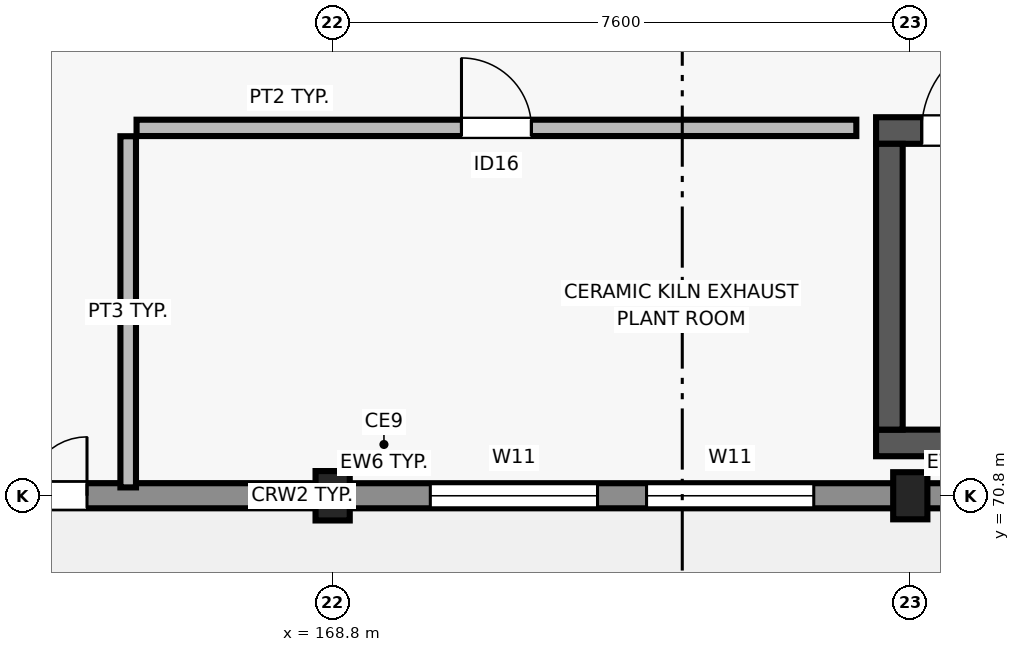
"""IFC4 building model, lengths in metres.
Left out: names, types, materials, properties, quantities, classifications, styles, units other than length and angle.
Written with IfcOpenShell. Run it as: python <this file> out.ifc"""

import sys

from ifc_helpers import new_model, si_unit, direction, frame, frame_2d, origin, origin_2d, place, context, subcontext, project, spatial, polyline, rectangle, outline, extrude, element, fill, save


model = new_model("IFC4")
c1 = context("Model", 3, precision=1e-05, world=origin(), true_north=direction((0.0, 1.0)))
c2 = subcontext(c1, "Body", "Model", "MODEL_VIEW")
j1 = project(units=[si_unit("LENGTHUNIT", "METRE"), si_unit("PLANEANGLEUNIT", "RADIAN")], contexts=[c1])
p1 = place(None, origin())
s1 = spatial("IfcSite", under=j1, at=p1, CompositionType="ELEMENT")
p2 = place(p1, origin())
s2 = spatial("IfcBuilding", under=s1, at=p2, CompositionType="ELEMENT")
p3 = place(p2, frame((0.0, 0.0, 25.8)))
s3 = spatial("IfcBuildingStorey", under=s2, at=p3, CompositionType="ELEMENT", Elevation=25.8)
p4 = place(p3, frame((168.8, 70.8, 0.0), z_axis=(0.0, 0.0, 1.0), x_axis=(1.0, 0.0, 0.0)))
e1 = element("IfcColumn", 1, at=p4, inside=s3, PredefinedType="COLUMN", context=c2, shape_type="SweptSolid", body=[
    extrude(rectangle(XDim=0.65, YDim=0.45, at=origin_2d()), origin(), (0.0, 0.0, 1.0), 4.2),
])
p5 = place(p3, frame((176.4, 70.8, 0.0), z_axis=(0.0, 0.0, 1.0), x_axis=(1.0, 0.0, 0.0)))
e2 = element("IfcColumn", 2, at=p5, inside=s3, PredefinedType="COLUMN", context=c2, shape_type="SweptSolid", body=[
    extrude(rectangle(XDim=0.62, YDim=0.45, at=origin_2d()), origin(), (0.0, 0.0, 1.0), 4.2),
])
p6 = place(p3, frame((161.105, 70.8, 0.0), z_axis=(0.0, 0.0, 1.0), x_axis=(1.0, 0.0, 0.0)))
e3 = element("IfcWall", 3, at=p6, inside=s3, PredefinedType="SOLIDWALL", context=c2, shape_type="SweptSolid", body=[
    extrude(rectangle(XDim=7.375, YDim=0.32, at=frame_2d((3.688, 0.0))), origin(), (0.0, 0.0, 1.0), 3.425),
])
p7 = place(p6, frame((2.913, 0.0, 0.0)))
e4 = element("IfcOpeningElement", 4, at=p7, cuts=e3, PredefinedType="OPENING", context=c2, shape_type="SweptSolid", body=[
    extrude(rectangle(XDim=1.55, YDim=2.2, at=frame_2d((0.775, 1.1))), frame((0.0, 0.17, 0.0), z_axis=(0.0, -1.0, 0.0), x_axis=(1.0, 0.0, 0.0)), (0.0, 0.0, 1.0), 0.34),
])
p8 = place(p3, frame((169.12, 70.8, 0.0), z_axis=(0.0, 0.0, 1.0), x_axis=(1.0, 0.0, 0.0)))
e5 = element("IfcWall", 5, at=p8, inside=s3, PredefinedType="SOLIDWALL", context=c2, shape_type="SweptSolid", body=[
    extrude(rectangle(XDim=6.975, YDim=0.305, at=frame_2d((3.487, 0.0))), origin(), (0.0, 0.0, 1.0), 3.425),
])
p9 = place(p8, frame((0.965, 0.0, 0.9)))
e6 = element("IfcOpeningElement", 6, at=p9, cuts=e5, PredefinedType="OPENING", context=c2, shape_type="SweptSolid", body=[
    extrude(rectangle(XDim=2.2, YDim=1.5, at=frame_2d((1.1, 0.75))), frame((0.0, 0.162, 0.0), z_axis=(0.0, -1.0, 0.0), x_axis=(1.0, 0.0, 0.0)), (0.0, 0.0, 1.0), 0.325),
])
p10 = place(p8, frame((3.81, 0.0, 0.9)))
e7 = element("IfcOpeningElement", 7, at=p10, cuts=e5, PredefinedType="OPENING", context=c2, shape_type="SweptSolid", body=[
    extrude(rectangle(XDim=2.2, YDim=1.5, at=frame_2d((1.1, 0.75))), frame((0.0, 0.162, 0.0), z_axis=(0.0, -1.0, 0.0), x_axis=(1.0, 0.0, 0.0)), (0.0, 0.0, 1.0), 0.325),
])
p11 = place(p3, frame((176.705, 70.8, 0.0), z_axis=(0.0, 0.0, 1.0), x_axis=(1.0, 0.0, 0.0)))
e8 = element("IfcWall", 8, at=p11, inside=s3, PredefinedType="SOLIDWALL", context=c2, shape_type="SweptSolid", body=[
    extrude(rectangle(XDim=6.975, YDim=0.29, at=frame_2d((3.487, 0.0))), origin(), (0.0, 0.0, 1.0), 3.425),
])
p12 = place(p11, frame((1.232, 0.0, 0.9)))
e9 = element("IfcOpeningElement", 9, at=p12, cuts=e8, PredefinedType="OPENING", context=c2, shape_type="SweptSolid", body=[
    extrude(rectangle(XDim=1.8, YDim=1.5, at=frame_2d((0.9, 0.75))), frame((0.0, 0.155, 0.0), z_axis=(0.0, -1.0, 0.0), x_axis=(1.0, 0.0, 0.0)), (0.0, 0.0, 1.0), 0.31),
])
p13 = place(p11, frame((3.943, 0.0, 0.9)))
e10 = element("IfcOpeningElement", 10, at=p13, cuts=e8, PredefinedType="OPENING", context=c2, shape_type="SweptSolid", body=[
    extrude(rectangle(XDim=1.8, YDim=1.5, at=frame_2d((0.9, 0.75))), frame((0.0, 0.155, 0.0), z_axis=(0.0, -1.0, 0.0), x_axis=(1.0, 0.0, 0.0)), (0.0, 0.0, 1.0), 0.31),
])
p14 = place(p3, frame((152.8, 70.8, 4.2), z_axis=(0.0, 0.0, 1.0), x_axis=(1.0, 0.0, 0.0)))
e11 = element("IfcWall", 11, at=p14, inside=s3, PredefinedType="PARAPET", context=c2, shape_type="SweptSolid", body=[
    extrude(outline(polyline([(0.0, 0.0), (31.2, 0.0), (31.2, 4.4), (29.25, 3.788), (27.3, 3.258), (25.35, 2.808), (23.4, 2.437), (21.45, 2.142), (19.5, 1.922), (17.55, 1.776), (15.6, 1.704), (13.65, 1.704), (11.7, 1.778), (9.75, 1.926), (7.8, 2.147), (5.85, 2.444), (3.9, 2.817), (1.95, 3.269), (0.0, 3.8), (0.0, 0.0)])), frame((0.0, 0.165, 0.0), z_axis=(0.0, -1.0, 0.0), x_axis=(1.0, 0.0, 0.0)), (0.0, 0.0, 1.0), 0.33),
])
p15 = place(p3, frame((175.95, 71.495, 0.0), z_axis=(0.0, 0.0, 1.0), x_axis=(1.0, 0.0, 0.0)))
e12 = element("IfcWall", 12, at=p15, inside=s3, PredefinedType="SHEAR", context=c2, shape_type="SweptSolid", body=[
    extrude(rectangle(XDim=8.1, YDim=0.35, at=frame_2d((4.05, 0.0))), origin(), (0.0, 0.0, 1.0), 3.92),
])
p16 = place(p3, frame((175.95, 75.605, 0.0), z_axis=(0.0, 0.0, 1.0), x_axis=(1.0, 0.0, 0.0)))
e13 = element("IfcWall", 13, at=p16, inside=s3, PredefinedType="SHEAR", context=c2, shape_type="SweptSolid", body=[
    extrude(rectangle(XDim=8.1, YDim=0.35, at=frame_2d((4.05, 0.0))), origin(), (0.0, 0.0, 1.0), 3.92),
])
p17 = place(p16, frame((0.6, 0.0, 0.0)))
e14 = element("IfcOpeningElement", 14, at=p17, cuts=e13, PredefinedType="OPENING", context=c2, shape_type="SweptSolid", body=[
    extrude(rectangle(XDim=1.25, YDim=2.2, at=frame_2d((0.625, 1.1))), frame((0.0, 0.185, 0.0), z_axis=(0.0, -1.0, 0.0), x_axis=(1.0, 0.0, 0.0)), (0.0, 0.0, 1.0), 0.37),
])
p18 = place(p3, frame((176.125, 71.67, 0.0), z_axis=(0.0, 0.0, 1.0), x_axis=(0.0, 1.0, 0.0)))
e15 = element("IfcWall", 15, at=p18, inside=s3, PredefinedType="SHEAR", context=c2, shape_type="SweptSolid", body=[
    extrude(rectangle(XDim=3.76, YDim=0.35, at=frame_2d((1.88, 0.0))), origin(), (0.0, 0.0, 1.0), 3.92),
])
p19 = place(p3, frame((166.22, 75.64, 0.0), z_axis=(0.0, 0.0, 1.0), x_axis=(1.0, 0.0, 0.0)))
e16 = element("IfcWall", 16, at=p19, inside=s3, PredefinedType="PARTITIONING", context=c2, shape_type="SweptSolid", body=[
    extrude(rectangle(XDim=9.47, YDim=0.215, at=frame_2d((4.735, 0.0))), origin(), (0.0, 0.0, 1.0), 3.9),
])
p20 = place(p19, frame((4.275, 0.0, 0.0)))
e17 = element("IfcOpeningElement", 17, at=p20, cuts=e16, PredefinedType="OPENING", context=c2, shape_type="SweptSolid", body=[
    extrude(rectangle(XDim=0.92, YDim=2.1, at=frame_2d((0.46, 1.05))), frame((0.0, 0.117, 0.0), z_axis=(0.0, -1.0, 0.0), x_axis=(1.0, 0.0, 0.0)), (0.0, 0.0, 1.0), 0.235),
])
p21 = place(p3, frame((166.11, 70.91, 0.0), z_axis=(0.0, 0.0, 1.0), x_axis=(0.0, 1.0, 0.0)))
e18 = element("IfcWall", 18, at=p21, inside=s3, PredefinedType="PARTITIONING", context=c2, shape_type="SweptSolid", body=[
    extrude(rectangle(XDim=4.62, YDim=0.205, at=frame_2d((2.31, 0.0))), origin(), (0.0, 0.0, 1.0), 3.9),
])
p22 = place(p7, frame((1.55, 0.0, 0.0), z_axis=(0.0, 0.0, 1.0), x_axis=(-1.0, 0.0, 0.0)))
e19 = element("IfcDoor", 19, at=p22, inside=s3, OperationType="DOUBLE_DOOR_SINGLE_SWING", PredefinedType="DOOR", context=c2, shape_type="SweptSolid", body=[
    extrude(rectangle(XDim=1.55, YDim=2.2, at=frame_2d((0.775, 1.1))), frame((0.0, 0.025, 0.0), z_axis=(0.0, -1.0, 0.0), x_axis=(1.0, 0.0, 0.0)), (0.0, 0.0, 1.0), 0.05),
])
fill(e4, e19)
p23 = place(p9, origin())
e20 = element("IfcWindow", 20, at=p23, inside=s3, PartitioningType="SINGLE_PANEL", PredefinedType="WINDOW", context=c2, shape_type="SweptSolid", body=[
    extrude(rectangle(XDim=2.2, YDim=1.5, at=frame_2d((1.1, 0.75))), frame((0.0, 0.03, 0.0), z_axis=(0.0, -1.0, 0.0), x_axis=(1.0, 0.0, 0.0)), (0.0, 0.0, 1.0), 0.06),
])
fill(e6, e20)
p24 = place(p10, origin())
e21 = element("IfcWindow", 21, at=p24, inside=s3, PartitioningType="SINGLE_PANEL", PredefinedType="WINDOW", context=c2, shape_type="SweptSolid", body=[
    extrude(rectangle(XDim=2.2, YDim=1.5, at=frame_2d((1.1, 0.75))), frame((0.0, 0.03, 0.0), z_axis=(0.0, -1.0, 0.0), x_axis=(1.0, 0.0, 0.0)), (0.0, 0.0, 1.0), 0.06),
])
fill(e7, e21)
p25 = place(p17, origin())
e22 = element("IfcDoor", 22, at=p25, inside=s3, OperationType="SINGLE_SWING_RIGHT", PredefinedType="DOOR", context=c2, shape_type="SweptSolid", body=[
    extrude(rectangle(XDim=1.25, YDim=2.2, at=frame_2d((0.625, 1.1))), frame((0.0, 0.025, 0.0), z_axis=(0.0, -1.0, 0.0), x_axis=(1.0, 0.0, 0.0)), (0.0, 0.0, 1.0), 0.05),
])
fill(e14, e22)
p26 = place(p20, origin())
e23 = element("IfcDoor", 23, at=p26, inside=s3, OperationType="SINGLE_SWING_LEFT", PredefinedType="DOOR", context=c2, shape_type="SweptSolid", body=[
    extrude(rectangle(XDim=0.92, YDim=2.1, at=frame_2d((0.46, 1.05))), frame((0.0, 0.025, 0.0), z_axis=(0.0, -1.0, 0.0), x_axis=(1.0, 0.0, 0.0)), (0.0, 0.0, 1.0), 0.05),
])
fill(e17, e23)
save(model, sys.argv[1])
